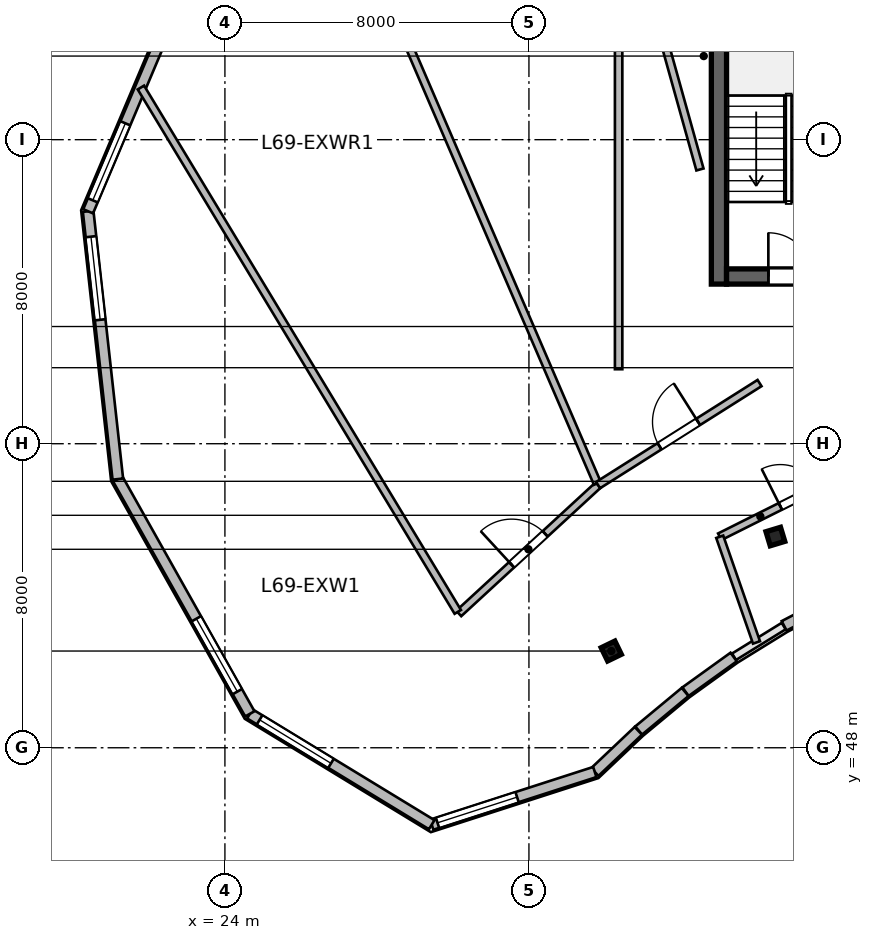
"""IFC4 building model, lengths in metres.
Left out: names, types, materials, properties, quantities, classifications, styles, units other than length and angle.
Written with IfcOpenShell. Run it as: python <this file> out.ifc"""

import sys

from ifc_helpers import new_model, si_unit, direction, frame, frame_2d, origin, origin_2d, place, context, subcontext, project, spatial, rectangle, i_section, extrude, source, transform, mapped, element, fill, save


model = new_model("IFC4")
c1 = context("Model", 3, precision=1e-05, world=origin(), true_north=direction((0.0, 1.0)))
c2 = subcontext(c1, "Body", "Model", "MODEL_VIEW")
j1 = project(units=[si_unit("LENGTHUNIT", "METRE"), si_unit("PLANEANGLEUNIT", "RADIAN")], contexts=[c1])
p1 = place(None, origin())
s1 = spatial("IfcSite", under=j1, at=p1, CompositionType="ELEMENT")
p2 = place(p1, origin())
s2 = spatial("IfcBuilding", under=s1, at=p2, CompositionType="ELEMENT")
p3 = place(p2, frame((0.0, 0.0, 283.5)))
s3 = spatial("IfcBuildingStorey", under=s2, at=p3, CompositionType="ELEMENT", Elevation=283.5)
m1 = source(origin(), c2, "Body", "SweptSolid", [
    extrude(rectangle(XDim=12.0, YDim=0.4, at=frame_2d((6.0, 0.0))), origin(), (0.0, 0.0, 1.0), 3.9),
])
p4 = place(p3, frame((37.0, 60.2, 0.0), z_axis=(0.0, 0.0, 1.0), x_axis=(0.0, 1.0, 0.0)))
e1 = element("IfcWall", 1, at=p4, inside=s3, PredefinedType="SHEAR", context=c2, shape_type="MappedRepresentation", body=[
    mapped(m1, transform((0.0, 0.0, 0.0), scale=1.0)),
])
m2 = source(origin(), c2, "Body", "SweptSolid", [
    extrude(rectangle(XDim=21.6, YDim=0.4, at=frame_2d((10.8, 0.0))), origin(), (0.0, 0.0, 1.0), 3.9),
])
p5 = place(p3, frame((37.2, 60.4, 0.0), z_axis=(0.0, 0.0, 1.0), x_axis=(1.0, 0.0, 0.0)))
e2 = element("IfcWall", 2, at=p5, inside=s3, PredefinedType="SHEAR", context=c2, shape_type="MappedRepresentation", body=[
    mapped(m2, transform((0.0, 0.0, 0.0), scale=1.0)),
])
p6 = place(p5, frame((1.1, 0.0, 0.0)))
e3 = element("IfcOpeningElement", 3, at=p6, cuts=e2, PredefinedType="OPENING", context=c2, shape_type="SweptSolid", body=[
    extrude(rectangle(XDim=1.15, YDim=2.15, at=frame_2d((0.575, 1.075))), frame((0.0, 0.21, 0.0), z_axis=(0.0, -1.0, 0.0), x_axis=(1.0, 0.0, 0.0)), (0.0, 0.0, 1.0), 0.42),
])
p7 = place(p5, frame((19.5, 0.0, 0.0)))
e4 = element("IfcOpeningElement", 4, at=p7, cuts=e2, PredefinedType="OPENING", context=c2, shape_type="SweptSolid", body=[
    extrude(rectangle(XDim=0.9, YDim=2.1, at=frame_2d((0.45, 1.05))), frame((0.0, 0.21, 0.0), z_axis=(0.0, -1.0, 0.0), x_axis=(1.0, 0.0, 0.0)), (0.0, 0.0, 1.0), 0.42),
])
p8 = place(p5, frame((12.02, 0.0, 0.0)))
e5 = element("IfcOpeningElement", 5, at=p8, cuts=e2, PredefinedType="OPENING", context=c2, shape_type="SweptSolid", body=[
    extrude(rectangle(XDim=1.6, YDim=2.15, at=frame_2d((0.8, 1.075))), frame((0.0, 0.21, 0.0), z_axis=(0.0, -1.0, 0.0), x_axis=(1.0, 0.0, 0.0)), (0.0, 0.0, 1.0), 0.42),
])
m3 = source(origin(), c2, "Body", "SweptSolid", [
    extrude(i_section(OverallWidth=0.399, OverallDepth=0.387, WebThickness=0.021, FlangeThickness=0.033, at=origin_2d()), origin(), (0.0, 0.0, 1.0), 3.9),
])
for number, where, z_axis, x_axis in (
    (6, (34.166, 50.545, 0.0), (0.0, 0.0, 1.0), (-0.436, 0.9, 0.0)),
    (7, (38.485, 53.558, 0.0), (0.0, 0.0, 1.0), (-0.289, 0.957, 0.0)),
):
    element("IfcColumn", number, at=place(p3, frame(where, z_axis=z_axis, x_axis=x_axis)), inside=s3, PredefinedType="COLUMN", context=c2, shape_type="MappedRepresentation", body=[
        mapped(m3, transform((0.0, 0.0, 0.0), scale=1.0)),
    ])
m4 = source(origin(), c2, "Body", "SweptSolid", [
    extrude(rectangle(XDim=1.512, YDim=0.28, at=frame_2d((0.756, 0.0))), origin(), (0.0, 0.0, 1.0), 3.64),
])
p9 = place(p3, frame((40.056, 51.906, 0.0), z_axis=(0.0, 0.0, 1.0), x_axis=(-0.886841011195, -0.462074691865, 0.0)))
e8 = element("IfcWall", 8, at=p9, inside=s3, PredefinedType="SOLIDWALL", context=c2, shape_type="MappedRepresentation", body=[
    mapped(m4, transform((0.0, 0.0, 0.0), scale=1.0)),
])
m5 = source(origin(), c2, "Body", "SweptSolid", [
    extrude(rectangle(XDim=1.561, YDim=0.28, at=frame_2d((0.781, 0.0))), origin(), (0.0, 0.0, 1.0), 3.64),
])
p10 = place(p3, frame((37.387, 50.387, 0.0), z_axis=(0.0, 0.0, 1.0), x_axis=(-0.81154027425, -0.584296485758, 0.0)))
e9 = element("IfcWall", 9, at=p10, inside=s3, PredefinedType="SOLIDWALL", context=c2, shape_type="MappedRepresentation", body=[
    mapped(m5, transform((0.0, 0.0, 0.0), scale=1.0)),
])
m6 = source(origin(), c2, "Body", "SweptSolid", [
    extrude(rectangle(XDim=1.589, YDim=0.28, at=frame_2d((0.794, 0.0))), origin(), (0.0, 0.0, 1.0), 3.64),
])
p11 = place(p3, frame((36.11, 49.468, 0.0), z_axis=(0.0, 0.0, 1.0), x_axis=(-0.769805836273, -0.63827813251, 0.0)))
e10 = element("IfcWall", 10, at=p11, inside=s3, PredefinedType="SOLIDWALL", context=c2, shape_type="MappedRepresentation", body=[
    mapped(m6, transform((0.0, 0.0, 0.0), scale=1.0)),
])
m7 = source(origin(), c2, "Body", "SweptSolid", [
    extrude(rectangle(XDim=1.577, YDim=0.28, at=frame_2d((0.789, 0.0))), origin(), (0.0, 0.0, 1.0), 3.64),
])
p12 = place(p3, frame((34.878, 48.446, 0.0), z_axis=(0.0, 0.0, 1.0), x_axis=(-0.726119464467, -0.687568558998, 0.0)))
e11 = element("IfcWall", 11, at=p12, inside=s3, PredefinedType="SOLIDWALL", context=c2, shape_type="MappedRepresentation", body=[
    mapped(m7, transform((0.0, 0.0, 0.0), scale=1.0)),
])
m8 = source(origin(), c2, "Body", "SweptSolid", [
    extrude(rectangle(XDim=4.509, YDim=0.28, at=frame_2d((2.255, 0.0))), origin(), (0.0, 0.0, 1.0), 3.64),
])
p13 = place(p3, frame((33.733, 47.361, 0.0), z_axis=(0.0, 0.0, 1.0), x_axis=(-0.95162949292, -0.307247958828, 0.0)))
e12 = element("IfcWall", 12, at=p13, inside=s3, PredefinedType="SOLIDWALL", context=c2, shape_type="MappedRepresentation", body=[
    mapped(m8, transform((0.0, 0.0, 0.0), scale=1.0)),
])
p14 = place(p13, frame((2.149, 0.0, 0.95)))
e13 = element("IfcOpeningElement", 13, at=p14, cuts=e12, PredefinedType="OPENING", context=c2, shape_type="SweptSolid", body=[
    extrude(rectangle(XDim=2.2, YDim=2.1, at=frame_2d((1.1, 1.05))), frame((0.0, 0.15, 0.0), z_axis=(0.0, -1.0, 0.0), x_axis=(1.0, 0.0, 0.0)), (0.0, 0.0, 1.0), 0.3),
])
m9 = source(origin(), c2, "Body", "SweptSolid", [
    extrude(rectangle(XDim=5.604, YDim=0.28, at=frame_2d((2.802, 0.0))), origin(), (0.0, 0.0, 1.0), 3.64),
])
p15 = place(p3, frame((29.442, 45.976, 0.0), z_axis=(0.0, 0.0, 1.0), x_axis=(-0.854002492971, 0.520268913158, 0.0)))
e14 = element("IfcWall", 14, at=p15, inside=s3, PredefinedType="SOLIDWALL", context=c2, shape_type="MappedRepresentation", body=[
    mapped(m9, transform((0.0, 0.0, 0.0), scale=1.0)),
])
p16 = place(p15, frame((3.103, 0.0, 0.95)))
e15 = element("IfcOpeningElement", 15, at=p16, cuts=e14, PredefinedType="OPENING", context=c2, shape_type="SweptSolid", body=[
    extrude(rectangle(XDim=2.2, YDim=2.1, at=frame_2d((1.1, 1.05))), frame((0.0, 0.15, 0.0), z_axis=(0.0, -1.0, 0.0), x_axis=(1.0, 0.0, 0.0)), (0.0, 0.0, 1.0), 0.3),
])
m10 = source(origin(), c2, "Body", "SweptSolid", [
    extrude(rectangle(XDim=7.087, YDim=0.28, at=frame_2d((3.543, 0.0))), origin(), (0.0, 0.0, 1.0), 3.64),
])
p17 = place(p3, frame((24.656, 48.892, 0.0), z_axis=(0.0, 0.0, 1.0), x_axis=(-0.490158199368, 0.871633489256, 0.0)))
e16 = element("IfcWall", 16, at=p17, inside=s3, PredefinedType="SOLIDWALL", context=c2, shape_type="MappedRepresentation", body=[
    mapped(m10, transform((0.0, 0.0, 0.0), scale=1.0)),
])
p18 = place(p17, frame((0.672, 0.0, 0.95)))
e17 = element("IfcOpeningElement", 17, at=p18, cuts=e16, PredefinedType="OPENING", context=c2, shape_type="SweptSolid", body=[
    extrude(rectangle(XDim=2.2, YDim=2.1, at=frame_2d((1.1, 1.05))), frame((0.0, 0.15, 0.0), z_axis=(0.0, -1.0, 0.0), x_axis=(1.0, 0.0, 0.0)), (0.0, 0.0, 1.0), 0.3),
])
m11 = source(origin(), c2, "Body", "SweptSolid", [
    extrude(rectangle(XDim=7.09, YDim=0.28, at=frame_2d((3.545, 0.0))), origin(), (0.0, 0.0, 1.0), 3.64),
])
p19 = place(p3, frame((21.182, 55.069, 0.0), z_axis=(0.0, 0.0, 1.0), x_axis=(-0.110159396922, 0.993913933532, 0.0)))
e18 = element("IfcWall", 18, at=p19, inside=s3, PredefinedType="SOLIDWALL", context=c2, shape_type="MappedRepresentation", body=[
    mapped(m11, transform((0.0, 0.0, 0.0), scale=1.0)),
])
p20 = place(p19, frame((4.217, 0.0, 0.95)))
e19 = element("IfcOpeningElement", 19, at=p20, cuts=e18, PredefinedType="OPENING", context=c2, shape_type="SweptSolid", body=[
    extrude(rectangle(XDim=2.2, YDim=2.1, at=frame_2d((1.1, 1.05))), frame((0.0, 0.15, 0.0), z_axis=(0.0, -1.0, 0.0), x_axis=(1.0, 0.0, 0.0)), (0.0, 0.0, 1.0), 0.3),
])
m12 = source(origin(), c2, "Body", "SweptSolid", [
    extrude(rectangle(XDim=5.655, YDim=0.28, at=frame_2d((2.828, 0.0))), origin(), (0.0, 0.0, 1.0), 3.64),
])
p21 = place(p3, frame((20.401, 62.116, 0.0), z_axis=(0.0, 0.0, 1.0), x_axis=(0.389585063528, 0.920990487614, 0.0)))
e20 = element("IfcWall", 20, at=p21, inside=s3, PredefinedType="SOLIDWALL", context=c2, shape_type="MappedRepresentation", body=[
    mapped(m12, transform((0.0, 0.0, 0.0), scale=1.0)),
])
p22 = place(p21, frame((0.314, 0.0, 0.95)))
e21 = element("IfcOpeningElement", 21, at=p22, cuts=e20, PredefinedType="OPENING", context=c2, shape_type="SweptSolid", body=[
    extrude(rectangle(XDim=2.2, YDim=2.1, at=frame_2d((1.1, 1.05))), frame((0.0, 0.15, 0.0), z_axis=(0.0, -1.0, 0.0), x_axis=(1.0, 0.0, 0.0)), (0.0, 0.0, 1.0), 0.3),
])
m13 = source(origin(), c2, "Body", "SweptSolid", [
    extrude(rectangle(XDim=4.271, YDim=0.195, at=frame_2d((2.135, 0.0))), origin(), (0.0, 0.0, 1.0), 3.64),
])
p23 = place(p3, frame((37.021, 53.552, 0.0), z_axis=(0.0, 0.0, 1.0), x_axis=(0.894061035522, 0.447945158207, 0.0)))
e22 = element("IfcWall", 22, at=p23, inside=s3, PredefinedType="PARTITIONING", context=c2, shape_type="MappedRepresentation", body=[
    mapped(m13, transform((0.0, 0.0, 0.0), scale=1.0)),
])
p24 = place(p23, frame((1.785, 0.0, 0.0)))
e23 = element("IfcOpeningElement", 23, at=p24, cuts=e22, PredefinedType="OPENING", context=c2, shape_type="SweptSolid", body=[
    extrude(rectangle(XDim=1.1, YDim=2.15, at=frame_2d((0.55, 1.075))), frame((0.0, 0.107, 0.0), z_axis=(0.0, -1.0, 0.0), x_axis=(1.0, 0.0, 0.0)), (0.0, 0.0, 1.0), 0.215),
])
m14 = source(origin(), c2, "Body", "SweptSolid", [
    extrude(rectangle(XDim=2.944, YDim=0.195, at=frame_2d((1.472, 0.0))), origin(), (0.0, 0.0, 1.0), 3.64),
])
p25 = place(p3, frame((37.988, 50.771, 0.0), z_axis=(0.0, 0.0, 1.0), x_axis=(-0.328565655286, 0.944481132774, 0.0)))
e24 = element("IfcWall", 24, at=p25, inside=s3, PredefinedType="PARTITIONING", context=c2, shape_type="MappedRepresentation", body=[
    mapped(m14, transform((0.0, 0.0, 0.0), scale=1.0)),
])
m15 = source(origin(), c2, "Body", "SweptSolid", [
    extrude(rectangle(XDim=4.986, YDim=0.195, at=frame_2d((2.493, 0.0))), origin(), (0.0, 0.0, 1.0), 3.64),
])
p26 = place(p3, frame((30.153, 51.533, 0.0), z_axis=(0.0, 0.0, 1.0), x_axis=(0.735595190169, 0.677421372707, 0.0)))
e25 = element("IfcWall", 25, at=p26, inside=s3, PredefinedType="PARTITIONING", context=c2, shape_type="MappedRepresentation", body=[
    mapped(m15, transform((0.0, 0.0, 0.0), scale=1.0)),
])
p27 = place(p26, frame((1.893, 0.0, 0.0)))
e26 = element("IfcOpeningElement", 26, at=p27, cuts=e25, PredefinedType="OPENING", context=c2, shape_type="SweptSolid", body=[
    extrude(rectangle(XDim=1.2, YDim=2.15, at=frame_2d((0.6, 1.075))), frame((0.0, 0.107, 0.0), z_axis=(0.0, -1.0, 0.0), x_axis=(1.0, 0.0, 0.0)), (0.0, 0.0, 1.0), 0.215),
])
m16 = source(origin(), c2, "Body", "SweptSolid", [
    extrude(rectangle(XDim=16.121, YDim=0.195, at=frame_2d((8.061, 0.0))), origin(), (0.0, 0.0, 1.0), 3.64),
])
p28 = place(p3, frame((30.127, 51.575, 0.0), z_axis=(0.0, 0.0, 1.0), x_axis=(-0.517212483904, 0.855857024563, 0.0)))
e27 = element("IfcWall", 27, at=p28, inside=s3, PredefinedType="PARTITIONING", context=c2, shape_type="MappedRepresentation", body=[
    mapped(m16, transform((0.0, 0.0, 0.0), scale=1.0)),
])
m17 = source(origin(), c2, "Body", "SweptSolid", [
    extrude(rectangle(XDim=17.556, YDim=0.195, at=frame_2d((8.778, 0.0))), origin(), (0.0, 0.0, 1.0), 3.64),
])
p29 = place(p3, frame((33.8, 54.958, 0.0), z_axis=(0.0, 0.0, 1.0), x_axis=(-0.395687598313, 0.918385172213, 0.0)))
e28 = element("IfcWall", 28, at=p29, inside=s3, PredefinedType="PARTITIONING", context=c2, shape_type="MappedRepresentation", body=[
    mapped(m17, transform((0.0, 0.0, 0.0), scale=1.0)),
])
m18 = source(origin(), c2, "Body", "SweptSolid", [
    extrude(rectangle(XDim=5.025, YDim=0.195, at=frame_2d((2.513, 0.0))), origin(), (0.0, 0.0, 1.0), 3.64),
])
p30 = place(p3, frame((33.82, 54.911, 0.0), z_axis=(0.0, 0.0, 1.0), x_axis=(0.84532378062, 0.534254345717, 0.0)))
e29 = element("IfcWall", 29, at=p30, inside=s3, PredefinedType="PARTITIONING", context=c2, shape_type="MappedRepresentation", body=[
    mapped(m18, transform((0.0, 0.0, 0.0), scale=1.0)),
])
p31 = place(p30, frame((1.913, 0.0, 0.0)))
e30 = element("IfcOpeningElement", 30, at=p31, cuts=e29, PredefinedType="OPENING", context=c2, shape_type="SweptSolid", body=[
    extrude(rectangle(XDim=1.2, YDim=2.15, at=frame_2d((0.6, 1.075))), frame((0.0, 0.107, 0.0), z_axis=(0.0, -1.0, 0.0), x_axis=(1.0, 0.0, 0.0)), (0.0, 0.0, 1.0), 0.215),
])
m19 = source(origin(), c2, "Body", "SweptSolid", [
    extrude(rectangle(XDim=12.311, YDim=0.195, at=frame_2d((6.155, 0.0))), origin(), (0.0, 0.0, 1.0), 3.64),
])
p32 = place(p3, frame((36.5, 63.216, 0.0), z_axis=(0.0, 0.0, 1.0), x_axis=(-0.268759602651, 0.963207286093, 0.0)))
e31 = element("IfcWall", 31, at=p32, inside=s3, PredefinedType="PARTITIONING", context=c2, shape_type="MappedRepresentation", body=[
    mapped(m19, transform((0.0, 0.0, 0.0), scale=1.0)),
])
m20 = source(origin(), c2, "Body", "SweptSolid", [
    extrude(rectangle(XDim=17.681, YDim=0.195, at=frame_2d((8.84, 0.0))), origin(), (0.0, 0.0, 1.0), 3.64),
])
p33 = place(p3, frame((34.36, 57.96, 0.0), z_axis=(0.0, 0.0, 1.0), x_axis=(0.0, 1.0, 0.0)))
e32 = element("IfcWall", 32, at=p33, inside=s3, PredefinedType="PARTITIONING", context=c2, shape_type="MappedRepresentation", body=[
    mapped(m20, transform((0.0, 0.0, 0.0), scale=1.0)),
])
m21 = source(origin(), c2, "Body", "SweptSolid", [
    extrude(rectangle(XDim=2.2, YDim=2.1, at=frame_2d((1.1, 1.05))), frame((0.0, 0.03, 0.0), z_axis=(0.0, -1.0, 0.0), x_axis=(1.0, 0.0, 0.0)), (0.0, 0.0, 1.0), 0.06),
])
p34 = place(p14, origin())
e33 = element("IfcWindow", 33, at=p34, inside=s3, PartitioningType="TRIPLE_PANEL_VERTICAL", PredefinedType="WINDOW", context=c2, shape_type="MappedRepresentation", body=[
    mapped(m21, transform((0.0, 0.0, 0.0), scale=1.0)),
])
fill(e13, e33)
p35 = place(p16, origin())
e34 = element("IfcWindow", 34, at=p35, inside=s3, PartitioningType="TRIPLE_PANEL_VERTICAL", PredefinedType="WINDOW", context=c2, shape_type="MappedRepresentation", body=[
    mapped(m21, transform((0.0, 0.0, 0.0), scale=1.0)),
])
fill(e15, e34)
p36 = place(p18, origin())
e35 = element("IfcWindow", 35, at=p36, inside=s3, PartitioningType="TRIPLE_PANEL_VERTICAL", PredefinedType="WINDOW", context=c2, shape_type="MappedRepresentation", body=[
    mapped(m21, transform((0.0, 0.0, 0.0), scale=1.0)),
])
fill(e17, e35)
p37 = place(p20, origin())
e36 = element("IfcWindow", 36, at=p37, inside=s3, PartitioningType="TRIPLE_PANEL_VERTICAL", PredefinedType="WINDOW", context=c2, shape_type="MappedRepresentation", body=[
    mapped(m21, transform((0.0, 0.0, 0.0), scale=1.0)),
])
fill(e19, e36)
p38 = place(p22, origin())
e37 = element("IfcWindow", 37, at=p38, inside=s3, PartitioningType="TRIPLE_PANEL_VERTICAL", PredefinedType="WINDOW", context=c2, shape_type="MappedRepresentation", body=[
    mapped(m21, transform((0.0, 0.0, 0.0), scale=1.0)),
])
fill(e21, e37)
m22 = source(origin(), c2, "Body", "SweptSolid", [
    extrude(rectangle(XDim=1.15, YDim=2.15, at=frame_2d((0.575, 1.075))), frame((0.0, 0.025, 0.0), z_axis=(0.0, -1.0, 0.0), x_axis=(1.0, 0.0, 0.0)), (0.0, 0.0, 1.0), 0.05),
])
p39 = place(p6, origin())
e38 = element("IfcDoor", 38, at=p39, inside=s3, OperationType="SINGLE_SWING_LEFT", PredefinedType="DOOR", context=c2, shape_type="MappedRepresentation", body=[
    mapped(m22, transform((0.0, 0.0, 0.0), scale=1.0)),
])
fill(e3, e38)
m23 = source(origin(), c2, "Body", "SweptSolid", [
    extrude(rectangle(XDim=1.1, YDim=2.15, at=frame_2d((0.55, 1.075))), frame((0.0, 0.025, 0.0), z_axis=(0.0, -1.0, 0.0), x_axis=(1.0, 0.0, 0.0)), (0.0, 0.0, 1.0), 0.05),
])
p40 = place(p24, origin())
e39 = element("IfcDoor", 39, at=p40, inside=s3, OperationType="SINGLE_SWING_LEFT", PredefinedType="DOOR", context=c2, shape_type="MappedRepresentation", body=[
    mapped(m23, transform((0.0, 0.0, 0.0), scale=1.0)),
])
fill(e23, e39)
m24 = source(origin(), c2, "Body", "SweptSolid", [
    extrude(rectangle(XDim=1.2, YDim=2.15, at=frame_2d((0.6, 1.075))), frame((0.0, 0.025, 0.0), z_axis=(0.0, -1.0, 0.0), x_axis=(1.0, 0.0, 0.0)), (0.0, 0.0, 1.0), 0.05),
])
p41 = place(p27, origin())
e40 = element("IfcDoor", 40, at=p41, inside=s3, OperationType="SINGLE_SWING_LEFT", PredefinedType="DOOR", context=c2, shape_type="MappedRepresentation", body=[
    mapped(m24, transform((0.0, 0.0, 0.0), scale=1.0)),
])
fill(e26, e40)
p42 = place(p31, origin())
e41 = element("IfcDoor", 41, at=p42, inside=s3, OperationType="SINGLE_SWING_RIGHT", PredefinedType="DOOR", context=c2, shape_type="MappedRepresentation", body=[
    mapped(m24, transform((0.0, 0.0, 0.0), scale=1.0)),
])
fill(e30, e41)
save(model, sys.argv[1])
